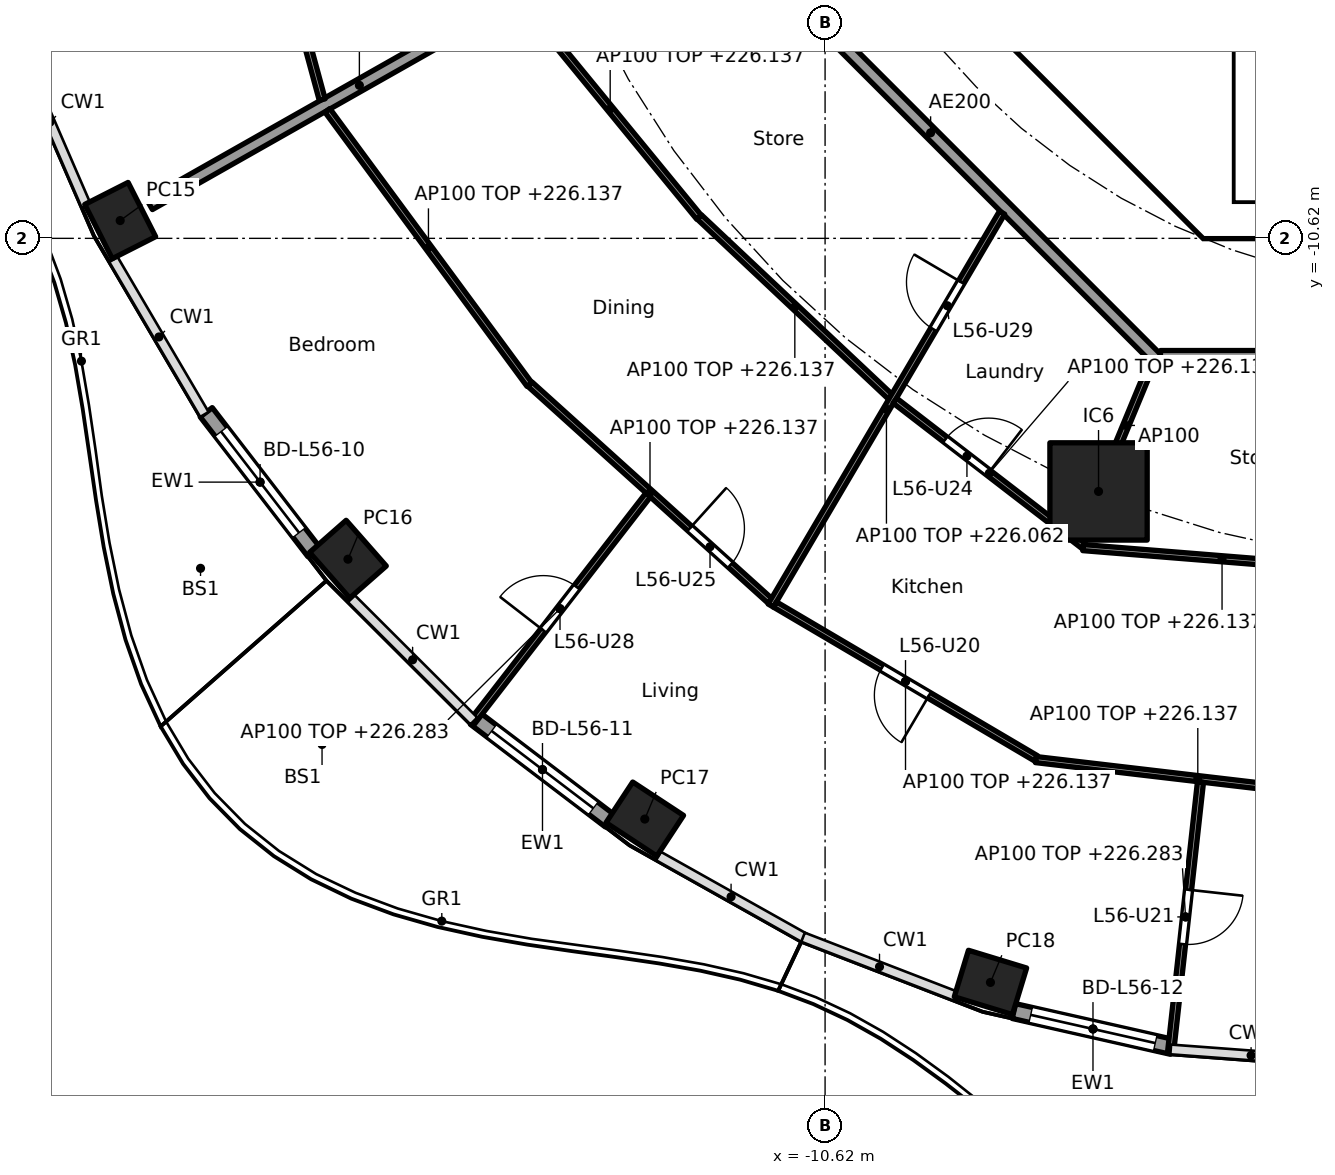
"""IFC4 building model, lengths in metres.
Left out: names, types, materials, properties, quantities, classifications, styles, units other than length and angle.
Written with IfcOpenShell. Run it as: python <this file> out.ifc"""

import sys

from ifc_helpers import new_model, si_unit, direction, frame, frame_2d, origin, origin_2d, place, context, subcontext, project, spatial, polyline, rectangle, hollow_rectangle, outline, extrude, element, fill, save


model = new_model("IFC4")
c1 = context("Model", 3, precision=1e-05, world=origin(), true_north=direction((0.0, 1.0)))
c2 = subcontext(c1, "Body", "Model", "MODEL_VIEW")
j1 = project(units=[si_unit("LENGTHUNIT", "METRE"), si_unit("PLANEANGLEUNIT", "RADIAN")], contexts=[c1])
p1 = place(None, origin())
s1 = spatial("IfcSite", under=j1, at=p1, CompositionType="ELEMENT")
p2 = place(p1, origin())
s2 = spatial("IfcBuilding", under=s1, at=p2, CompositionType="ELEMENT")
p3 = place(p2, frame((0.0, 0.0, 223.3)))
s3 = spatial("IfcBuildingStorey", under=s2, at=p3, CompositionType="ELEMENT", Elevation=223.3)
for number, where, z_axis, x_axis in (
    (1, (-22.212, -10.327, 0.0), (0.0, 0.0, 1.0), (0.452, -0.892, 0.0)),
    (2, (-18.467, -15.896, 0.0), (0.0, 0.0, 1.0), (0.66, -0.751, 0.0)),
    (3, (-13.585, -20.17, 0.0), (0.0, 0.0, 1.0), (0.836, -0.549, 0.0)),
    (4, (-7.9, -22.856, 0.0), (0.0, 0.0, 1.0), (0.957, -0.292, 0.0)),
):
    element("IfcColumn", number, at=place(p3, frame(where, z_axis=z_axis, x_axis=x_axis)), inside=s3, PredefinedType="COLUMN", context=c2, shape_type="SweptSolid", body=[
        extrude(hollow_rectangle(XDim=1.0, YDim=0.8, WallThickness=0.032, at=origin_2d()), origin(), (0.0, 0.0, 1.0), 3.7),
    ])
p4 = place(p3, frame((-6.123, -14.782, 0.0), z_axis=(0.0, 0.0, 1.0), x_axis=(1.0, 0.0, 0.0)))
e5 = element("IfcColumn", 5, at=p4, inside=s3, PredefinedType="COLUMN", context=c2, shape_type="SweptSolid", body=[
    extrude(rectangle(XDim=1.6, YDim=1.6, at=origin_2d()), origin(), (0.0, 0.0, 1.0), 3.7),
])
p5 = place(p3, frame((-19.026, -15.778, 0.0), z_axis=(0.0, 0.0, 1.0), x_axis=(-0.610438565676, 0.792063607001, 0.0)))
e6 = element("IfcWall", 6, at=p5, inside=s3, PredefinedType="SOLIDWALL", context=c2, shape_type="SweptSolid", body=[
    extrude(rectangle(XDim=2.901, YDim=0.25, at=frame_2d((1.45, 0.0))), origin(), (0.0, 0.0, 1.0), 3.44),
])
p6 = place(p5, frame((0.4, 0.0, 0.0)))
e7 = element("IfcOpeningElement", 7, at=p6, cuts=e6, PredefinedType="OPENING", context=c2, shape_type="SweptSolid", body=[
    extrude(rectangle(XDim=2.1, YDim=2.4, at=frame_2d((1.05, 1.2))), frame((0.0, 0.135, 0.0), z_axis=(0.0, -1.0, 0.0), x_axis=(1.0, 0.0, 0.0)), (0.0, 0.0, 1.0), 0.27),
])
p7 = place(p3, frame((-14.157, -20.201, 0.0), z_axis=(0.0, 0.0, 1.0), x_axis=(-0.795990084031, 0.60530966135, 0.0)))
e8 = element("IfcWall", 8, at=p7, inside=s3, PredefinedType="SOLIDWALL", context=c2, shape_type="SweptSolid", body=[
    extrude(rectangle(XDim=2.789, YDim=0.25, at=frame_2d((1.394, 0.0))), origin(), (0.0, 0.0, 1.0), 3.44),
])
p8 = place(p7, frame((0.344, 0.0, 0.0)))
e9 = element("IfcOpeningElement", 9, at=p8, cuts=e8, PredefinedType="OPENING", context=c2, shape_type="SweptSolid", body=[
    extrude(rectangle(XDim=2.1, YDim=2.4, at=frame_2d((1.05, 1.2))), frame((0.0, 0.135, 0.0), z_axis=(0.0, -1.0, 0.0), x_axis=(1.0, 0.0, 0.0)), (0.0, 0.0, 1.0), 0.27),
])
p9 = place(p3, frame((-4.914, -23.916, 0.0), z_axis=(0.0, 0.0, 1.0), x_axis=(-0.975324089124, 0.220777990694, 0.0)))
e10 = element("IfcWall", 10, at=p9, inside=s3, PredefinedType="SOLIDWALL", context=c2, shape_type="SweptSolid", body=[
    extrude(rectangle(XDim=2.666, YDim=0.25, at=frame_2d((1.333, 0.0))), origin(), (0.0, 0.0, 1.0), 3.44),
])
p10 = place(p9, frame((0.283, 0.0, 0.0)))
e11 = element("IfcOpeningElement", 11, at=p10, cuts=e10, PredefinedType="OPENING", context=c2, shape_type="SweptSolid", body=[
    extrude(rectangle(XDim=2.1, YDim=2.4, at=frame_2d((1.05, 1.2))), frame((0.0, 0.135, 0.0), z_axis=(0.0, -1.0, 0.0), x_axis=(1.0, 0.0, 0.0)), (0.0, 0.0, 1.0), 0.27),
])
p11 = place(p3, frame((-9.988, -4.613, 0.0), z_axis=(0.0, 0.0, 1.0), x_axis=(0.707106781187, -0.707106781187, 0.0)))
e12 = element("IfcWall", 12, at=p11, inside=s3, PredefinedType="SHEAR", context=c2, shape_type="SweptSolid", body=[
    extrude(rectangle(XDim=7.602, YDim=0.6, at=frame_2d((3.801, 0.0))), origin(), (0.0, 0.0, 1.0), 3.44),
])
p12 = place(p11, frame((6.151, 0.0, 0.0)))
e13 = element("IfcOpeningElement", 13, at=p12, cuts=e12, PredefinedType="OPENING", context=c2, shape_type="SweptSolid", body=[
    extrude(rectangle(XDim=1.1, YDim=2.1, at=frame_2d((0.55, 1.05))), frame((0.0, 0.31, 0.0), z_axis=(0.0, -1.0, 0.0), x_axis=(1.0, 0.0, 0.0)), (0.0, 0.0, 1.0), 0.62),
])
p13 = place(p3, origin())
e14 = element("IfcWall", 14, at=p13, inside=s3, PredefinedType="SHEAR", context=c2, shape_type="SweptSolid", body=[
    extrude(outline(polyline([(-4.152, -10.025), (4.152, -10.025), (4.401, -9.776), (4.825, -10.2), (4.401, -10.625), (-4.401, -10.625), (-4.825, -10.2), (-4.401, -9.776), (-4.152, -10.025)])), origin(), (0.0, 0.0, 1.0), 3.44),
])
p14 = place(p3, origin())
e15 = element("IfcWall", 15, at=p14, inside=s3, PredefinedType="SOLIDWALL", context=c2, shape_type="SweptSolid", body=[
    extrude(outline(polyline([(-3.9, -10.025), (-4.1, -10.025), (-4.1, -7.025), (-3.9, -7.025), (-3.9, -10.025)])), origin(), (0.0, 0.0, 1.0), 3.44),
])
p15 = place(p3, frame((-14.825, -6.148, 0.0), z_axis=(0.0, 0.0, 1.0), x_axis=(-0.870099576105, -0.492875975944, 0.0)))
e16 = element("IfcWall", 16, at=p15, inside=s3, PredefinedType="PARTITIONING", context=c2, shape_type="SweptSolid", body=[
    extrude(rectangle(XDim=7.937, YDim=0.2, at=frame_2d((3.969, 0.0))), origin(), (0.0, 0.0, 1.0), 2.837),
])
p16 = place(p3, frame((-12.635, -5.134, 0.0), z_axis=(0.0, 0.0, 1.0), x_axis=(0.707106781187, -0.707106781187, 0.0)))
e17 = element("IfcWall", 17, at=p16, inside=s3, PredefinedType="PARTITIONING", context=c2, shape_type="SweptSolid", body=[
    extrude(rectangle(XDim=10.609, YDim=0.2, at=frame_2d((5.305, 0.0))), origin(), (0.0, 0.0, 1.0), 3.44),
])
p17 = place(p3, frame((-5.104, -12.565, 0.0), z_axis=(0.0, 0.0, 1.0), x_axis=(1.0, 0.0, 0.0)))
e18 = element("IfcWall", 18, at=p17, inside=s3, PredefinedType="PARTITIONING", context=c2, shape_type="SweptSolid", body=[
    extrude(rectangle(XDim=10.409, YDim=0.2, at=frame_2d((5.205, 0.0))), origin(), (0.0, 0.0, 1.0), 3.44),
])
p18 = place(p17, frame((4.604, 0.0, 0.0)))
e19 = element("IfcOpeningElement", 19, at=p18, cuts=e18, PredefinedType="OPENING", context=c2, shape_type="SweptSolid", body=[
    extrude(rectangle(XDim=1.0, YDim=2.1, at=frame_2d((0.5, 1.05))), frame((0.0, 0.11, 0.0), z_axis=(0.0, -1.0, 0.0), x_axis=(1.0, 0.0, 0.0)), (0.0, 0.0, 1.0), 0.22),
])
p19 = place(p3, frame((-20.292, -3.17, 0.0), z_axis=(0.0, 0.0, 1.0), x_axis=(0.26187906236, -0.965100697698, 0.0)))
e20 = element("IfcWall", 20, at=p19, inside=s3, PredefinedType="PARTITIONING", context=c2, shape_type="SweptSolid", body=[
    extrude(rectangle(XDim=5.356, YDim=0.1, at=frame_2d((2.678, 0.0))), origin(), (0.0, 0.0, 1.0), 2.837),
])
p20 = place(p19, frame((2.228, 0.0, 0.0)))
e21 = element("IfcOpeningElement", 21, at=p20, cuts=e20, PredefinedType="OPENING", context=c2, shape_type="SweptSolid", body=[
    extrude(rectangle(XDim=0.9, YDim=2.1, at=frame_2d((0.45, 1.05))), frame((0.0, 0.06, 0.0), z_axis=(0.0, -1.0, 0.0), x_axis=(1.0, 0.0, 0.0)), (0.0, 0.0, 1.0), 0.12),
])
p21 = place(p3, frame((-15.616, -6.708, 0.0), z_axis=(0.0, 0.0, 1.0), x_axis=(0.634076422357, -0.773270386483, 0.0)))
e22 = element("IfcWall", 22, at=p21, inside=s3, PredefinedType="PARTITIONING", context=c2, shape_type="SweptSolid", body=[
    extrude(rectangle(XDim=4.611, YDim=0.1, at=frame_2d((2.306, 0.0))), origin(), (0.0, 0.0, 1.0), 2.837),
])
p22 = place(p3, frame((-18.804, -8.516, 0.0), z_axis=(0.0, 0.0, 1.0), x_axis=(0.593249583583, -0.805018590828, 0.0)))
e23 = element("IfcWall", 23, at=p22, inside=s3, PredefinedType="PARTITIONING", context=c2, shape_type="SweptSolid", body=[
    extrude(rectangle(XDim=5.602, YDim=0.1, at=frame_2d((2.801, 0.0))), origin(), (0.0, 0.0, 1.0), 2.837),
])
p23 = place(p3, frame((-12.688, -10.27, 0.0), z_axis=(0.0, 0.0, 1.0), x_axis=(0.728268142903, -0.685292282192, 0.0)))
e24 = element("IfcWall", 24, at=p23, inside=s3, PredefinedType="PARTITIONING", context=c2, shape_type="SweptSolid", body=[
    extrude(rectangle(XDim=4.312, YDim=0.1, at=frame_2d((2.156, 0.0))), origin(), (0.0, 0.0, 1.0), 2.837),
])
p24 = place(p3, frame((-15.474, -13.019, 0.0), z_axis=(0.0, 0.0, 1.0), x_axis=(0.742348572616, -0.670013878017, 0.0)))
e25 = element("IfcWall", 25, at=p24, inside=s3, PredefinedType="PARTITIONING", context=c2, shape_type="SweptSolid", body=[
    extrude(rectangle(XDim=5.319, YDim=0.1, at=frame_2d((2.66, 0.0))), origin(), (0.0, 0.0, 1.0), 2.837),
])
p25 = place(p24, frame((3.54, 0.0, 0.0)))
e26 = element("IfcOpeningElement", 26, at=p25, cuts=e25, PredefinedType="OPENING", context=c2, shape_type="SweptSolid", body=[
    extrude(rectangle(XDim=0.9, YDim=2.1, at=frame_2d((0.45, 1.05))), frame((0.0, 0.06, 0.0), z_axis=(0.0, -1.0, 0.0), x_axis=(1.0, 0.0, 0.0)), (0.0, 0.0, 1.0), 0.12),
])
p26 = place(p3, frame((-13.53, -14.84, 0.0), z_axis=(0.0, 0.0, 1.0), x_axis=(-0.612546685222, -0.790434411209, 0.0)))
e27 = element("IfcWall", 27, at=p26, inside=s3, PredefinedType="PARTITIONING", context=c2, shape_type="SweptSolid", body=[
    extrude(rectangle(XDim=4.732, YDim=0.1, at=frame_2d((2.366, 0.0))), origin(), (0.0, 0.0, 1.0), 2.983),
])
p27 = place(p26, frame((1.916, 0.0, 0.0)))
e28 = element("IfcOpeningElement", 28, at=p27, cuts=e27, PredefinedType="OPENING", context=c2, shape_type="SweptSolid", body=[
    extrude(rectangle(XDim=0.9, YDim=2.1, at=frame_2d((0.45, 1.05))), frame((0.0, 0.06, 0.0), z_axis=(0.0, -1.0, 0.0), x_axis=(1.0, 0.0, 0.0)), (0.0, 0.0, 1.0), 0.12),
])
p28 = place(p3, frame((-7.709, -10.198, 0.0), z_axis=(0.0, 0.0, 1.0), x_axis=(-0.507362999545, -0.861732433353, 0.0)))
e29 = element("IfcWall", 29, at=p28, inside=s3, PredefinedType="PARTITIONING", context=c2, shape_type="SweptSolid", body=[
    extrude(rectangle(XDim=7.499, YDim=0.1, at=frame_2d((3.749, 0.0))), origin(), (0.0, 0.0, 1.0), 2.762),
])
p29 = place(p28, frame((1.326, 0.0, 0.0)))
e30 = element("IfcOpeningElement", 30, at=p29, cuts=e29, PredefinedType="OPENING", context=c2, shape_type="SweptSolid", body=[
    extrude(rectangle(XDim=0.9, YDim=2.1, at=frame_2d((0.45, 1.05))), frame((0.0, 0.06, 0.0), z_axis=(0.0, -1.0, 0.0), x_axis=(1.0, 0.0, 0.0)), (0.0, 0.0, 1.0), 0.12),
])
p30 = place(p3, frame((-9.471, -13.289, 0.0), z_axis=(0.0, 0.0, 1.0), x_axis=(0.7922205419, -0.61023488346, 0.0)))
e31 = element("IfcWall", 31, at=p30, inside=s3, PredefinedType="PARTITIONING", context=c2, shape_type="SweptSolid", body=[
    extrude(rectangle(XDim=3.916, YDim=0.1, at=frame_2d((1.958, 0.0))), origin(), (0.0, 0.0, 1.0), 2.837),
])
p31 = place(p30, frame((1.045, 0.0, 0.0)))
e32 = element("IfcOpeningElement", 32, at=p31, cuts=e31, PredefinedType="OPENING", context=c2, shape_type="SweptSolid", body=[
    extrude(rectangle(XDim=0.9, YDim=2.1, at=frame_2d((0.45, 1.05))), frame((0.0, 0.06, 0.0), z_axis=(0.0, -1.0, 0.0), x_axis=(1.0, 0.0, 0.0)), (0.0, 0.0, 1.0), 0.12),
])
p32 = place(p3, frame((-11.445, -16.641, 0.0), z_axis=(0.0, 0.0, 1.0), x_axis=(0.861562560957, -0.507651409489, 0.0)))
e33 = element("IfcWall", 33, at=p32, inside=s3, PredefinedType="PARTITIONING", context=c2, shape_type="SweptSolid", body=[
    extrude(rectangle(XDim=4.985, YDim=0.1, at=frame_2d((2.492, 0.0))), origin(), (0.0, 0.0, 1.0), 2.837),
])
p33 = place(p32, frame((2.042, 0.0, 0.0)))
e34 = element("IfcOpeningElement", 34, at=p33, cuts=e33, PredefinedType="OPENING", context=c2, shape_type="SweptSolid", body=[
    extrude(rectangle(XDim=0.9, YDim=2.1, at=frame_2d((0.45, 1.05))), frame((0.0, 0.06, 0.0), z_axis=(0.0, -1.0, 0.0), x_axis=(1.0, 0.0, 0.0)), (0.0, 0.0, 1.0), 0.12),
])
p34 = place(p3, frame((-5.243, -12.657, 0.0), z_axis=(0.0, 0.0, 1.0), x_axis=(-0.382719158442, -0.923864733477, 0.0)))
e35 = element("IfcWall", 35, at=p34, inside=s3, PredefinedType="PARTITIONING", context=c2, shape_type="SweptSolid", body=[
    extrude(rectangle(XDim=2.25, YDim=0.1, at=frame_2d((1.125, 0.0))), origin(), (0.0, 0.0, 1.0), 3.44),
])
p35 = place(p3, frame((-6.379, -15.705, 0.0), z_axis=(0.0, 0.0, 1.0), x_axis=(0.996786462227, -0.080104611105, 0.0)))
e36 = element("IfcWall", 36, at=p35, inside=s3, PredefinedType="PARTITIONING", context=c2, shape_type="SweptSolid", body=[
    extrude(rectangle(XDim=4.59, YDim=0.1, at=frame_2d((2.295, 0.0))), origin(), (0.0, 0.0, 1.0), 2.837),
])
p36 = place(p3, frame((-7.156, -19.191, 0.0), z_axis=(0.0, 0.0, 1.0), x_axis=(0.993172627718, -0.116653896424, 0.0)))
e37 = element("IfcWall", 37, at=p36, inside=s3, PredefinedType="PARTITIONING", context=c2, shape_type="SweptSolid", body=[
    extrude(rectangle(XDim=5.368, YDim=0.1, at=frame_2d((2.684, 0.0))), origin(), (0.0, 0.0, 1.0), 2.837),
])
p37 = place(p3, frame((-4.447, -19.56, 0.0), z_axis=(0.0, 0.0, 1.0), x_axis=(-0.109897425445, -0.993942933915, 0.0)))
e38 = element("IfcWall", 38, at=p37, inside=s3, PredefinedType="PARTITIONING", context=c2, shape_type="SweptSolid", body=[
    extrude(rectangle(XDim=4.465, YDim=0.1, at=frame_2d((2.233, 0.0))), origin(), (0.0, 0.0, 1.0), 2.983),
])
p38 = place(p37, frame((1.783, 0.0, 0.0)))
e39 = element("IfcOpeningElement", 39, at=p38, cuts=e38, PredefinedType="OPENING", context=c2, shape_type="SweptSolid", body=[
    extrude(rectangle(XDim=0.9, YDim=2.1, at=frame_2d((0.45, 1.05))), frame((0.0, 0.06, 0.0), z_axis=(0.0, -1.0, 0.0), x_axis=(1.0, 0.0, 0.0)), (0.0, 0.0, 1.0), 0.12),
])
p39 = place(p6, origin())
e40 = element("IfcDoor", 40, at=p39, inside=s3, OperationType="SLIDING_TO_LEFT", PredefinedType="DOOR", context=c2, shape_type="SweptSolid", body=[
    extrude(rectangle(XDim=2.1, YDim=2.4, at=frame_2d((1.05, 1.2))), frame((0.0, 0.025, 0.0), z_axis=(0.0, -1.0, 0.0), x_axis=(1.0, 0.0, 0.0)), (0.0, 0.0, 1.0), 0.05),
])
fill(e7, e40)
p40 = place(p8, origin())
e41 = element("IfcDoor", 41, at=p40, inside=s3, OperationType="SLIDING_TO_LEFT", PredefinedType="DOOR", context=c2, shape_type="SweptSolid", body=[
    extrude(rectangle(XDim=2.1, YDim=2.4, at=frame_2d((1.05, 1.2))), frame((0.0, 0.025, 0.0), z_axis=(0.0, -1.0, 0.0), x_axis=(1.0, 0.0, 0.0)), (0.0, 0.0, 1.0), 0.05),
])
fill(e9, e41)
p41 = place(p10, origin())
e42 = element("IfcDoor", 42, at=p41, inside=s3, OperationType="SLIDING_TO_LEFT", PredefinedType="DOOR", context=c2, shape_type="SweptSolid", body=[
    extrude(rectangle(XDim=2.1, YDim=2.4, at=frame_2d((1.05, 1.2))), frame((0.0, 0.025, 0.0), z_axis=(0.0, -1.0, 0.0), x_axis=(1.0, 0.0, 0.0)), (0.0, 0.0, 1.0), 0.05),
])
fill(e11, e42)
p42 = place(p12, origin())
e43 = element("IfcDoor", 43, at=p42, inside=s3, OperationType="SINGLE_SWING_LEFT", PredefinedType="DOOR", context=c2, shape_type="SweptSolid", body=[
    extrude(rectangle(XDim=1.1, YDim=2.1, at=frame_2d((0.55, 1.05))), frame((0.0, 0.025, 0.0), z_axis=(0.0, -1.0, 0.0), x_axis=(1.0, 0.0, 0.0)), (0.0, 0.0, 1.0), 0.05),
])
fill(e13, e43)
p43 = place(p33, frame((0.9, 0.0, 0.0), x_axis=(-1.0, 0.0, 0.0)))
e44 = element("IfcDoor", 44, at=p43, inside=s3, OperationType="SINGLE_SWING_LEFT", PredefinedType="DOOR", context=c2, shape_type="SweptSolid", body=[
    extrude(rectangle(XDim=0.9, YDim=2.1, at=frame_2d((0.45, 1.05))), frame((0.0, 0.025, 0.0), z_axis=(0.0, -1.0, 0.0), x_axis=(1.0, 0.0, 0.0)), (0.0, 0.0, 1.0), 0.05),
])
fill(e34, e44)
p44 = place(p38, origin())
e45 = element("IfcDoor", 45, at=p44, inside=s3, OperationType="SINGLE_SWING_LEFT", PredefinedType="DOOR", context=c2, shape_type="SweptSolid", body=[
    extrude(rectangle(XDim=0.9, YDim=2.1, at=frame_2d((0.45, 1.05))), frame((0.0, 0.025, 0.0), z_axis=(0.0, -1.0, 0.0), x_axis=(1.0, 0.0, 0.0)), (0.0, 0.0, 1.0), 0.05),
])
fill(e39, e45)
p45 = place(p31, origin())
e46 = element("IfcDoor", 46, at=p45, inside=s3, OperationType="SINGLE_SWING_RIGHT", PredefinedType="DOOR", context=c2, shape_type="SweptSolid", body=[
    extrude(rectangle(XDim=0.9, YDim=2.1, at=frame_2d((0.45, 1.05))), frame((0.0, 0.025, 0.0), z_axis=(0.0, -1.0, 0.0), x_axis=(1.0, 0.0, 0.0)), (0.0, 0.0, 1.0), 0.05),
])
fill(e32, e46)
p46 = place(p25, origin())
e47 = element("IfcDoor", 47, at=p46, inside=s3, OperationType="SINGLE_SWING_LEFT", PredefinedType="DOOR", context=c2, shape_type="SweptSolid", body=[
    extrude(rectangle(XDim=0.9, YDim=2.1, at=frame_2d((0.45, 1.05))), frame((0.0, 0.025, 0.0), z_axis=(0.0, -1.0, 0.0), x_axis=(1.0, 0.0, 0.0)), (0.0, 0.0, 1.0), 0.05),
])
fill(e26, e47)
p47 = place(p27, frame((0.9, 0.0, 0.0), x_axis=(-1.0, 0.0, 0.0)))
e48 = element("IfcDoor", 48, at=p47, inside=s3, OperationType="SINGLE_SWING_LEFT", PredefinedType="DOOR", context=c2, shape_type="SweptSolid", body=[
    extrude(rectangle(XDim=0.9, YDim=2.1, at=frame_2d((0.45, 1.05))), frame((0.0, 0.025, 0.0), z_axis=(0.0, -1.0, 0.0), x_axis=(1.0, 0.0, 0.0)), (0.0, 0.0, 1.0), 0.05),
])
fill(e28, e48)
p48 = place(p29, frame((0.9, 0.0, 0.0), x_axis=(-1.0, 0.0, 0.0)))
e49 = element("IfcDoor", 49, at=p48, inside=s3, OperationType="SINGLE_SWING_RIGHT", PredefinedType="DOOR", context=c2, shape_type="SweptSolid", body=[
    extrude(rectangle(XDim=0.9, YDim=2.1, at=frame_2d((0.45, 1.05))), frame((0.0, 0.025, 0.0), z_axis=(0.0, -1.0, 0.0), x_axis=(1.0, 0.0, 0.0)), (0.0, 0.0, 1.0), 0.05),
])
fill(e30, e49)
save(model, sys.argv[1])
